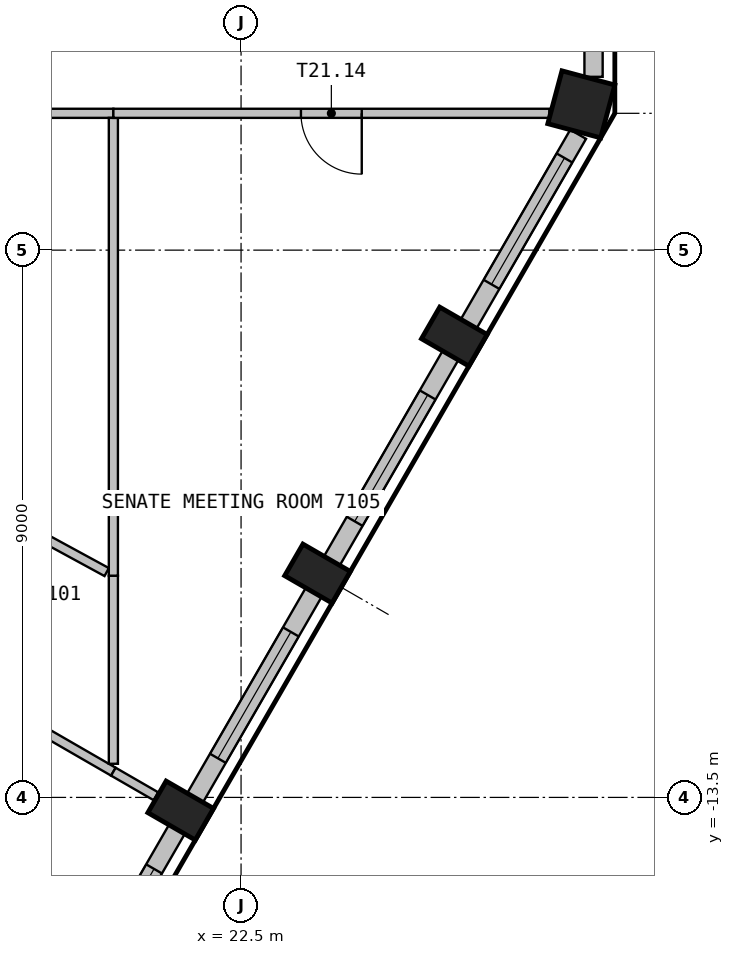
"""IFC4 building model, lengths in metres.
Left out: names, types, materials, properties, quantities, classifications, styles, units other than length and angle.
Written with IfcOpenShell. Run it as: python <this file> out.ifc"""

import sys

from ifc_helpers import new_model, si_unit, direction, frame, frame_2d, origin, origin_2d, place, context, subcontext, project, spatial, rectangle, extrude, element, fill, save


model = new_model("IFC4")
c1 = context("Model", 3, precision=1e-05, world=origin(), true_north=direction((0.0, 1.0)))
c2 = subcontext(c1, "Body", "Model", "MODEL_VIEW")
j1 = project(units=[si_unit("LENGTHUNIT", "METRE"), si_unit("PLANEANGLEUNIT", "RADIAN")], contexts=[c1])
p1 = place(None, origin())
s1 = spatial("IfcSite", under=j1, at=p1, CompositionType="ELEMENT")
p2 = place(p1, origin())
s2 = spatial("IfcBuilding", under=s1, at=p2, CompositionType="ELEMENT")
p3 = place(p2, frame((0.0, 0.0, 286.5)))
s3 = spatial("IfcBuildingStorey", under=s2, at=p3, CompositionType="ELEMENT", Elevation=286.5)
for number, where, z_axis, x_axis in (
    (1, (21.507, -13.716, 0.0), (0.0, 0.0, 1.0), (0.5, 0.866, 0.0)),
    (2, (23.757, -9.819, 0.0), (0.0, 0.0, 1.0), (0.5, 0.866, 0.0)),
    (3, (26.007, -5.922, 0.0), (0.0, 0.0, 1.0), (0.5, 0.866, 0.0)),
):
    element("IfcColumn", number, at=place(p3, frame(where, z_axis=z_axis, x_axis=x_axis)), inside=s3, PredefinedType="COLUMN", context=c2, shape_type="SweptSolid", body=[
        extrude(rectangle(XDim=0.6, YDim=0.9, at=origin_2d()), origin(), (0.0, 0.0, 1.0), 3.575),
    ])
p4 = place(p3, frame((28.096, -2.102, 0.0), z_axis=(0.0, 0.0, 1.0), x_axis=(0.258819045103, 0.965925826289, 0.0)))
e4 = element("IfcColumn", 4, at=p4, inside=s3, PredefinedType="COLUMN", context=c2, shape_type="SweptSolid", body=[
    extrude(rectangle(XDim=0.9, YDim=0.9, at=origin_2d()), origin(), (0.0, 0.0, 1.0), 3.575),
])
p5 = place(p3, frame((19.644, -17.144, 0.0), z_axis=(0.0, 0.0, 1.0), x_axis=(0.50001992892, 0.866013897511, 0.0)))
e5 = element("IfcWall", 5, at=p5, inside=s3, PredefinedType="SOLIDWALL", context=c2, shape_type="SweptSolid", body=[
    extrude(rectangle(XDim=3.599, YDim=0.3, at=frame_2d((1.8, 0.0))), origin(), (0.0, 0.0, 1.0), 3.575),
])
p6 = place(p5, frame((0.45, 0.0, 0.9)))
e6 = element("IfcOpeningElement", 6, at=p6, cuts=e5, PredefinedType="OPENING", context=c2, shape_type="SweptSolid", body=[
    extrude(rectangle(XDim=2.4, YDim=2.1, at=frame_2d((1.2, 1.05))), frame((0.0, 0.16, 0.0), z_axis=(0.0, -1.0, 0.0), x_axis=(1.0, 0.0, 0.0)), (0.0, 0.0, 1.0), 0.32),
])
p7 = place(p3, frame((21.744, -13.506, 0.0), z_axis=(0.0, 0.0, 1.0), x_axis=(0.499984428715, 0.866034393683, 0.0)))
e7 = element("IfcWall", 7, at=p7, inside=s3, PredefinedType="SOLIDWALL", context=c2, shape_type="SweptSolid", body=[
    extrude(rectangle(XDim=3.899, YDim=0.3, at=frame_2d((1.949, 0.0))), origin(), (0.0, 0.0, 1.0), 3.575),
])
p8 = place(p7, frame((0.75, 0.0, 0.9)))
e8 = element("IfcOpeningElement", 8, at=p8, cuts=e7, PredefinedType="OPENING", context=c2, shape_type="SweptSolid", body=[
    extrude(rectangle(XDim=2.4, YDim=2.1, at=frame_2d((1.2, 1.05))), frame((0.0, 0.16, 0.0), z_axis=(0.0, -1.0, 0.0), x_axis=(1.0, 0.0, 0.0)), (0.0, 0.0, 1.0), 0.32),
])
p9 = place(p3, frame((23.994, -9.609, 0.0), z_axis=(0.0, 0.0, 1.0), x_axis=(0.500011542666, 0.866018739521, 0.0)))
e9 = element("IfcWall", 9, at=p9, inside=s3, PredefinedType="SOLIDWALL", context=c2, shape_type="SweptSolid", body=[
    extrude(rectangle(XDim=3.899, YDim=0.3, at=frame_2d((1.949, 0.0))), origin(), (0.0, 0.0, 1.0), 3.575),
])
p10 = place(p9, frame((0.75, 0.0, 0.9)))
e10 = element("IfcOpeningElement", 10, at=p10, cuts=e9, PredefinedType="OPENING", context=c2, shape_type="SweptSolid", body=[
    extrude(rectangle(XDim=2.4, YDim=2.1, at=frame_2d((1.2, 1.05))), frame((0.0, 0.16, 0.0), z_axis=(0.0, -1.0, 0.0), x_axis=(1.0, 0.0, 0.0)), (0.0, 0.0, 1.0), 0.32),
])
p11 = place(p3, frame((26.244, -5.712, 0.0), z_axis=(0.0, 0.0, 1.0), x_axis=(0.499969057507, 0.866043267704, 0.0)))
e11 = element("IfcWall", 11, at=p11, inside=s3, PredefinedType="SOLIDWALL", context=c2, shape_type="SweptSolid", body=[
    extrude(rectangle(XDim=3.599, YDim=0.3, at=frame_2d((1.8, 0.0))), origin(), (0.0, 0.0, 1.0), 3.575),
])
p12 = place(p11, frame((0.75, 0.0, 0.9)))
e12 = element("IfcOpeningElement", 12, at=p12, cuts=e11, PredefinedType="OPENING", context=c2, shape_type="SweptSolid", body=[
    extrude(rectangle(XDim=2.4, YDim=2.1, at=frame_2d((1.2, 1.05))), frame((0.0, 0.16, 0.0), z_axis=(0.0, -1.0, 0.0), x_axis=(1.0, 0.0, 0.0)), (0.0, 0.0, 1.0), 0.32),
])
p13 = place(p3, frame((28.297, -1.65, 0.0), z_axis=(0.0, 0.0, 1.0), x_axis=(0.0, 1.0, 0.0)))
e13 = element("IfcWall", 13, at=p13, inside=s3, PredefinedType="SOLIDWALL", context=c2, shape_type="SweptSolid", body=[
    extrude(rectangle(XDim=3.3, YDim=0.3, at=frame_2d((1.65, 0.0))), origin(), (0.0, 0.0, 1.0), 3.575),
])
p14 = place(p13, frame((0.45, 0.0, 0.9)))
e14 = element("IfcOpeningElement", 14, at=p14, cuts=e13, PredefinedType="OPENING", context=c2, shape_type="SweptSolid", body=[
    extrude(rectangle(XDim=2.4, YDim=2.1, at=frame_2d((1.2, 1.05))), frame((0.0, 0.16, 0.0), z_axis=(0.0, -1.0, 0.0), x_axis=(1.0, 0.0, 0.0)), (0.0, 0.0, 1.0), 0.32),
])
p15 = place(p3, frame((15.965, -10.517, 0.0), z_axis=(0.0, 0.0, 1.0), x_axis=(0.866037122116, -0.499979702705, 0.0)))
e15 = element("IfcWall", 15, at=p15, inside=s3, PredefinedType="PARTITIONING", context=c2, shape_type="SweptSolid", body=[
    extrude(rectangle(XDim=5.121, YDim=0.15, at=frame_2d((2.561, 0.0))), origin(), (0.0, 0.0, 1.0), 3.575),
])
p16 = place(p3, frame((15.966, -7.442, 0.0), z_axis=(0.0, 0.0, 1.0), x_axis=(0.87845030383, -0.47783371972, 0.0)))
e16 = element("IfcWall", 16, at=p16, inside=s3, PredefinedType="PARTITIONING", context=c2, shape_type="SweptSolid", body=[
    extrude(rectangle(XDim=4.923, YDim=0.15, at=frame_2d((2.461, 0.0))), origin(), (0.0, 0.0, 1.0), 3.575),
])
p17 = place(p3, frame((20.4, -2.25, 0.0), z_axis=(0.0, 0.0, 1.0), x_axis=(-1.0, 0.0, 0.0)))
e17 = element("IfcWall", 17, at=p17, inside=s3, PredefinedType="PARTITIONING", context=c2, shape_type="SweptSolid", body=[
    extrude(rectangle(XDim=4.425, YDim=0.15, at=frame_2d((2.212, 0.0))), origin(), (0.0, 0.0, 1.0), 3.575),
])
p18 = place(p3, frame((20.4, -9.854, 0.0), z_axis=(0.0, 0.0, 1.0), x_axis=(0.0, -1.0, 0.0)))
e18 = element("IfcWall", 18, at=p18, inside=s3, PredefinedType="PARTITIONING", context=c2, shape_type="SweptSolid", body=[
    extrude(rectangle(XDim=3.093, YDim=0.15, at=frame_2d((1.546, 0.0))), origin(), (0.0, 0.0, 1.0), 3.575),
])
p19 = place(p3, frame((20.4, -13.077, 0.0), z_axis=(0.0, 0.0, 1.0), x_axis=(0.866080027667, -0.499905376722, 0.0)))
e19 = element("IfcWall", 19, at=p19, inside=s3, PredefinedType="PARTITIONING", context=c2, shape_type="SweptSolid", body=[
    extrude(rectangle(XDim=0.809, YDim=0.15, at=frame_2d((0.404, 0.0))), origin(), (0.0, 0.0, 1.0), 3.575),
])
p20 = place(p3, frame((20.4, -2.325, 0.0), z_axis=(0.0, 0.0, 1.0), x_axis=(0.0, -1.0, 0.0)))
e20 = element("IfcWall", 20, at=p20, inside=s3, PredefinedType="PARTITIONING", context=c2, shape_type="SweptSolid", body=[
    extrude(rectangle(XDim=7.529, YDim=0.15, at=frame_2d((3.765, 0.0))), origin(), (0.0, 0.0, 1.0), 3.575),
])
p21 = place(p3, frame((27.57, -2.25, 0.0), z_axis=(0.0, 0.0, 1.0), x_axis=(-1.0, 0.0, 0.0)))
e21 = element("IfcWall", 21, at=p21, inside=s3, PredefinedType="PARTITIONING", context=c2, shape_type="SweptSolid", body=[
    extrude(rectangle(XDim=7.17, YDim=0.15, at=frame_2d((3.585, 0.0))), origin(), (0.0, 0.0, 1.0), 3.575),
])
p22 = place(p21, frame((3.085, 0.0, 0.0)))
e22 = element("IfcOpeningElement", 22, at=p22, cuts=e21, PredefinedType="OPENING", context=c2, shape_type="SweptSolid", body=[
    extrude(rectangle(XDim=1.0, YDim=2.1, at=frame_2d((0.5, 1.05))), frame((0.0, 0.085, 0.0), z_axis=(0.0, -1.0, 0.0), x_axis=(1.0, 0.0, 0.0)), (0.0, 0.0, 1.0), 0.17),
])
p23 = place(p6, origin())
e23 = element("IfcWindow", 23, at=p23, inside=s3, PartitioningType="SINGLE_PANEL", PredefinedType="WINDOW", context=c2, shape_type="SweptSolid", body=[
    extrude(rectangle(XDim=2.4, YDim=2.1, at=frame_2d((1.2, 1.05))), frame((0.0, 0.03, 0.0), z_axis=(0.0, -1.0, 0.0), x_axis=(1.0, 0.0, 0.0)), (0.0, 0.0, 1.0), 0.06),
])
fill(e6, e23)
p24 = place(p8, origin())
e24 = element("IfcWindow", 24, at=p24, inside=s3, PartitioningType="SINGLE_PANEL", PredefinedType="WINDOW", context=c2, shape_type="SweptSolid", body=[
    extrude(rectangle(XDim=2.4, YDim=2.1, at=frame_2d((1.2, 1.05))), frame((0.0, 0.03, 0.0), z_axis=(0.0, -1.0, 0.0), x_axis=(1.0, 0.0, 0.0)), (0.0, 0.0, 1.0), 0.06),
])
fill(e8, e24)
p25 = place(p10, origin())
e25 = element("IfcWindow", 25, at=p25, inside=s3, PartitioningType="SINGLE_PANEL", PredefinedType="WINDOW", context=c2, shape_type="SweptSolid", body=[
    extrude(rectangle(XDim=2.4, YDim=2.1, at=frame_2d((1.2, 1.05))), frame((0.0, 0.03, 0.0), z_axis=(0.0, -1.0, 0.0), x_axis=(1.0, 0.0, 0.0)), (0.0, 0.0, 1.0), 0.06),
])
fill(e10, e25)
p26 = place(p12, origin())
e26 = element("IfcWindow", 26, at=p26, inside=s3, PartitioningType="SINGLE_PANEL", PredefinedType="WINDOW", context=c2, shape_type="SweptSolid", body=[
    extrude(rectangle(XDim=2.4, YDim=2.1, at=frame_2d((1.2, 1.05))), frame((0.0, 0.03, 0.0), z_axis=(0.0, -1.0, 0.0), x_axis=(1.0, 0.0, 0.0)), (0.0, 0.0, 1.0), 0.06),
])
fill(e12, e26)
p27 = place(p22, origin())
e27 = element("IfcDoor", 27, at=p27, inside=s3, OperationType="SINGLE_SWING_LEFT", PredefinedType="DOOR", context=c2, shape_type="SweptSolid", body=[
    extrude(rectangle(XDim=1.0, YDim=2.1, at=frame_2d((0.5, 1.05))), frame((0.0, 0.025, 0.0), z_axis=(0.0, -1.0, 0.0), x_axis=(1.0, 0.0, 0.0)), (0.0, 0.0, 1.0), 0.05),
])
fill(e22, e27)
save(model, sys.argv[1])
